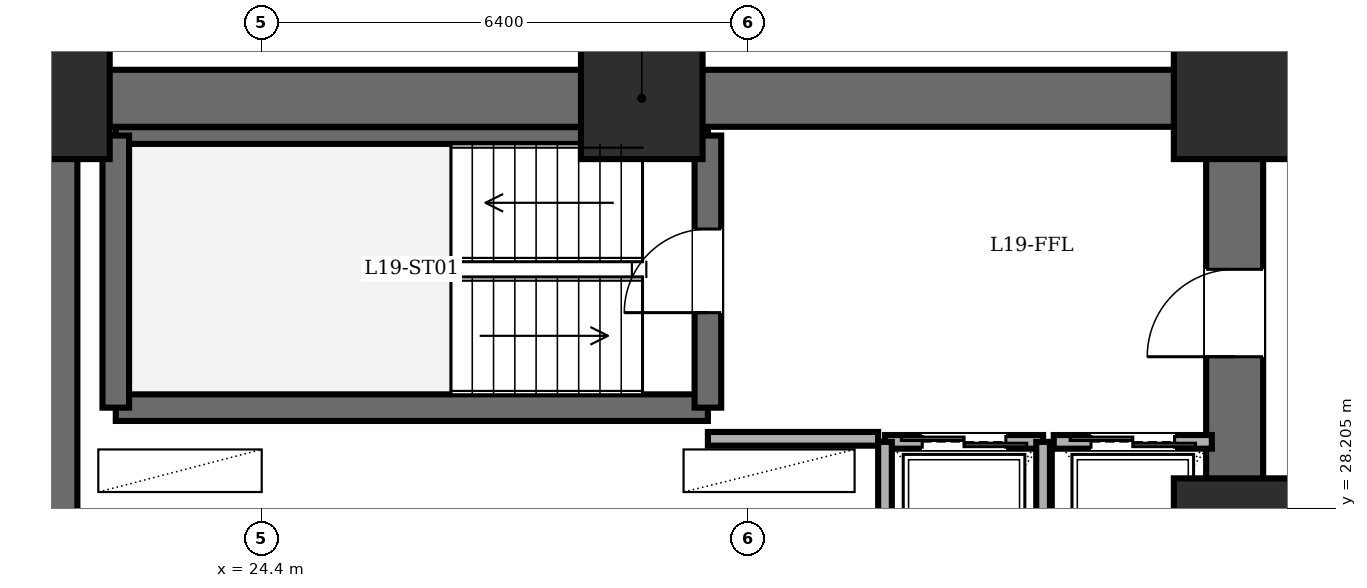
"""IFC4 building model, lengths in metres.
Left out: names, types, materials, properties, quantities, classifications, styles, units other than length and angle.
Written with IfcOpenShell. Run it as: python <this file> out.ifc"""

import sys

from ifc_helpers import new_model, si_unit, direction, frame, frame_2d, origin, origin_2d, place, context, subcontext, project, spatial, rectangle, extrude, element, fill, save


model = new_model("IFC4")
c1 = context("Model", 3, precision=1e-05, world=origin(), true_north=direction((0.0, 1.0)))
c2 = subcontext(c1, "Body", "Model", "MODEL_VIEW")
j1 = project(units=[si_unit("LENGTHUNIT", "METRE"), si_unit("PLANEANGLEUNIT", "RADIAN")], contexts=[c1])
p1 = place(None, origin())
s1 = spatial("IfcSite", under=j1, at=p1, CompositionType="ELEMENT")
p2 = place(p1, origin())
s2 = spatial("IfcBuilding", under=s1, at=p2, CompositionType="ELEMENT")
p3 = place(p2, frame((0.0, 0.0, 72.0)))
s3 = spatial("IfcBuildingStorey", under=s2, at=p3, CompositionType="ELEMENT", Elevation=72.0)
for number, where, z_axis, x_axis in (
    (1, (37.2, 27.8, 0.0), (0.0, 0.0, 1.0), (1.0, 0.0, 0.0)),
    (2, (37.2, 33.6, 0.0), (0.0, 0.0, 1.0), (1.0, 0.0, 0.0)),
    (3, (29.4, 33.6, 0.0), (0.0, 0.0, 1.0), (1.0, 0.0, 0.0)),
    (4, (21.6, 33.6, 0.0), (0.0, 0.0, 1.0), (1.0, 0.0, 0.0)),
):
    element("IfcColumn", number, at=place(p3, frame(where, z_axis=z_axis, x_axis=x_axis)), inside=s3, PredefinedType="COLUMN", context=c2, shape_type="SweptSolid", body=[
        extrude(rectangle(XDim=1.6, YDim=1.6, at=origin_2d()), origin(), (0.0, 0.0, 1.0), 3.6),
    ])
p4 = place(p3, frame((21.6, 14.4, 0.0), z_axis=(0.0, 0.0, 1.0), x_axis=(0.0, 1.0, 0.0)))
e5 = element("IfcWall", 5, at=p4, inside=s3, PredefinedType="SHEAR", context=c2, shape_type="SweptSolid", body=[
    extrude(rectangle(XDim=19.2, YDim=0.75, at=frame_2d((9.6, 0.0))), origin(), (0.0, 0.0, 1.0), 3.36),
])
p5 = place(p3, frame((21.6, 33.6, 0.0), z_axis=(0.0, 0.0, 1.0), x_axis=(1.0, 0.0, 0.0)))
e6 = element("IfcWall", 6, at=p5, inside=s3, PredefinedType="SHEAR", context=c2, shape_type="SweptSolid", body=[
    extrude(rectangle(XDim=15.6, YDim=0.75, at=frame_2d((7.8, 0.0))), origin(), (0.0, 0.0, 1.0), 3.36),
])
p6 = place(p3, frame((37.2, 14.4, 0.0), z_axis=(0.0, 0.0, 1.0), x_axis=(0.0, 1.0, 0.0)))
e7 = element("IfcWall", 7, at=p6, inside=s3, PredefinedType="SHEAR", context=c2, shape_type="SweptSolid", body=[
    extrude(rectangle(XDim=19.2, YDim=0.75, at=frame_2d((9.6, 0.0))), origin(), (0.0, 0.0, 1.0), 3.36),
])
p7 = place(p6, frame((15.8, 0.0, 0.0)))
e8 = element("IfcOpeningElement", 8, at=p7, cuts=e7, PredefinedType="OPENING", context=c2, shape_type="SweptSolid", body=[
    extrude(rectangle(XDim=1.15, YDim=2.15, at=frame_2d((0.575, 1.075))), frame((0.0, 0.385, 0.0), z_axis=(0.0, -1.0, 0.0), x_axis=(1.0, 0.0, 0.0)), (0.0, 0.0, 1.0), 0.77),
])
p8 = place(p6, frame((3.6, 0.0, 0.0)))
e9 = element("IfcOpeningElement", 9, at=p8, cuts=e7, PredefinedType="OPENING", context=c2, shape_type="SweptSolid", body=[
    extrude(rectangle(XDim=1.1, YDim=2.15, at=frame_2d((0.55, 1.075))), frame((0.0, 0.385, 0.0), z_axis=(0.0, -1.0, 0.0), x_axis=(1.0, 0.0, 0.0)), (0.0, 0.0, 1.0), 0.77),
])
p9 = place(p6, frame((8.6, 0.0, 0.0)))
e10 = element("IfcOpeningElement", 10, at=p9, cuts=e7, PredefinedType="OPENING", context=c2, shape_type="SweptSolid", body=[
    extrude(rectangle(XDim=1.3, YDim=2.2, at=frame_2d((0.65, 1.1))), frame((0.0, 0.385, 0.0), z_axis=(0.0, -1.0, 0.0), x_axis=(1.0, 0.0, 0.0)), (0.0, 0.0, 1.0), 0.77),
])
p10 = place(p3, frame((22.48, 29.53, 0.0), z_axis=(0.0, 0.0, 1.0), x_axis=(1.0, 0.0, 0.0)))
e11 = element("IfcWall", 11, at=p10, inside=s3, PredefinedType="SOLIDWALL", context=c2, shape_type="SweptSolid", body=[
    extrude(rectangle(XDim=7.79, YDim=0.35, at=frame_2d((3.895, 0.0))), origin(), (0.0, 0.0, 1.0), 3.36),
])
p11 = place(p3, frame((22.48, 33.11, 0.0), z_axis=(0.0, 0.0, 1.0), x_axis=(1.0, 0.0, 0.0)))
e12 = element("IfcWall", 12, at=p11, inside=s3, PredefinedType="PARTITIONING", context=c2, shape_type="SweptSolid", body=[
    extrude(rectangle(XDim=7.79, YDim=0.22, at=frame_2d((3.895, 0.0))), origin(), (0.0, 0.0, 1.0), 3.36),
])
p12 = place(p3, frame((22.48, 29.53, 0.0), z_axis=(0.0, 0.0, 1.0), x_axis=(0.0, 1.0, 0.0)))
e13 = element("IfcWall", 13, at=p12, inside=s3, PredefinedType="SOLIDWALL", context=c2, shape_type="SweptSolid", body=[
    extrude(rectangle(XDim=3.58, YDim=0.35, at=frame_2d((1.79, 0.0))), origin(), (0.0, 0.0, 1.0), 3.36),
])
p13 = place(p3, frame((30.27, 29.53, 0.0), z_axis=(0.0, 0.0, 1.0), x_axis=(0.0, 1.0, 0.0)))
e14 = element("IfcWall", 14, at=p13, inside=s3, PredefinedType="SOLIDWALL", context=c2, shape_type="SweptSolid", body=[
    extrude(rectangle(XDim=3.58, YDim=0.35, at=frame_2d((1.79, 0.0))), origin(), (0.0, 0.0, 1.0), 3.36),
])
p14 = place(p13, frame((1.25, 0.0, 0.0)))
e15 = element("IfcOpeningElement", 15, at=p14, cuts=e14, PredefinedType="OPENING", context=c2, shape_type="SweptSolid", body=[
    extrude(rectangle(XDim=1.1, YDim=2.15, at=frame_2d((0.55, 1.075))), frame((0.0, 0.185, 0.0), z_axis=(0.0, -1.0, 0.0), x_axis=(1.0, 0.0, 0.0)), (0.0, 0.0, 1.0), 0.37),
])
p15 = place(p3, frame((30.27, 29.12, 0.0), z_axis=(0.0, 0.0, 1.0), x_axis=(1.0, 0.0, 0.0)))
e16 = element("IfcWall", 16, at=p15, inside=s3, PredefinedType="PARTITIONING", context=c2, shape_type="SweptSolid", body=[
    extrude(rectangle(XDim=2.24, YDim=0.18, at=frame_2d((1.12, 0.0))), origin(), (0.0, 0.0, 1.0), 3.36),
])
p16 = place(p3, frame((32.6, 29.08, 0.0), z_axis=(0.0, 0.0, 1.0), x_axis=(1.0, 0.0, 0.0)))
e17 = element("IfcWall", 17, at=p16, inside=s3, PredefinedType="PARTITIONING", context=c2, shape_type="SweptSolid", body=[
    extrude(rectangle(XDim=2.08, YDim=0.18, at=frame_2d((1.04, 0.0))), origin(), (0.0, 0.0, 1.0), 3.36),
])
p17 = place(p16, frame((0.49, 0.0, 0.0)))
e18 = element("IfcOpeningElement", 18, at=p17, cuts=e17, PredefinedType="OPENING", context=c2, shape_type="SweptSolid", body=[
    extrude(rectangle(XDim=1.1, YDim=2.2, at=frame_2d((0.55, 1.1))), frame((0.0, 0.1, 0.0), z_axis=(0.0, -1.0, 0.0), x_axis=(1.0, 0.0, 0.0)), (0.0, 0.0, 1.0), 0.2),
])
for number, where, z_axis, x_axis in (
    (19, (34.68, 26.35, 0.0), (0.0, 0.0, 1.0), (0.0, 1.0, 0.0)),
    (20, (32.6, 29.08, 0.0), (0.0, 0.0, 1.0), (0.0, -1.0, 0.0)),
):
    element("IfcWall", number, at=place(p3, frame(where, z_axis=z_axis, x_axis=x_axis)), inside=s3, PredefinedType="PARTITIONING", context=c2, shape_type="SweptSolid", body=[
        extrude(rectangle(XDim=2.73, YDim=0.18, at=frame_2d((1.365, 0.0))), origin(), (0.0, 0.0, 1.0), 3.36),
    ])
p18 = place(p3, frame((34.82, 29.08, 0.0), z_axis=(0.0, 0.0, 1.0), x_axis=(1.0, 0.0, 0.0)))
e21 = element("IfcWall", 21, at=p18, inside=s3, PredefinedType="PARTITIONING", context=c2, shape_type="SweptSolid", body=[
    extrude(rectangle(XDim=2.08, YDim=0.18, at=frame_2d((1.04, 0.0))), origin(), (0.0, 0.0, 1.0), 3.36),
])
p19 = place(p18, frame((0.49, 0.0, 0.0)))
e22 = element("IfcOpeningElement", 22, at=p19, cuts=e21, PredefinedType="OPENING", context=c2, shape_type="SweptSolid", body=[
    extrude(rectangle(XDim=1.1, YDim=2.2, at=frame_2d((0.55, 1.1))), frame((0.0, 0.1, 0.0), z_axis=(0.0, -1.0, 0.0), x_axis=(1.0, 0.0, 0.0)), (0.0, 0.0, 1.0), 0.2),
])
p20 = place(p14, origin())
e23 = element("IfcDoor", 23, at=p20, inside=s3, OperationType="SINGLE_SWING_LEFT", PredefinedType="DOOR", context=c2, shape_type="SweptSolid", body=[
    extrude(rectangle(XDim=1.1, YDim=2.15, at=frame_2d((0.55, 1.075))), frame((0.0, 0.025, 0.0), z_axis=(0.0, -1.0, 0.0), x_axis=(1.0, 0.0, 0.0)), (0.0, 0.0, 1.0), 0.05),
])
fill(e15, e23)
p21 = place(p7, origin())
e24 = element("IfcDoor", 24, at=p21, inside=s3, OperationType="SINGLE_SWING_LEFT", PredefinedType="DOOR", context=c2, shape_type="SweptSolid", body=[
    extrude(rectangle(XDim=1.15, YDim=2.15, at=frame_2d((0.575, 1.075))), frame((0.0, 0.025, 0.0), z_axis=(0.0, -1.0, 0.0), x_axis=(1.0, 0.0, 0.0)), (0.0, 0.0, 1.0), 0.05),
])
fill(e8, e24)
p22 = place(p17, origin())
e25 = element("IfcDoor", 25, at=p22, inside=s3, OperationType="DOUBLE_DOOR_SLIDING", PredefinedType="DOOR", context=c2, shape_type="SweptSolid", body=[
    extrude(rectangle(XDim=1.1, YDim=2.2, at=frame_2d((0.55, 1.1))), frame((0.0, 0.025, 0.0), z_axis=(0.0, -1.0, 0.0), x_axis=(1.0, 0.0, 0.0)), (0.0, 0.0, 1.0), 0.05),
])
fill(e18, e25)
p23 = place(p19, origin())
e26 = element("IfcDoor", 26, at=p23, inside=s3, OperationType="DOUBLE_DOOR_SLIDING", PredefinedType="DOOR", context=c2, shape_type="SweptSolid", body=[
    extrude(rectangle(XDim=1.1, YDim=2.2, at=frame_2d((0.55, 1.1))), frame((0.0, 0.025, 0.0), z_axis=(0.0, -1.0, 0.0), x_axis=(1.0, 0.0, 0.0)), (0.0, 0.0, 1.0), 0.05),
])
fill(e22, e26)
save(model, sys.argv[1])
